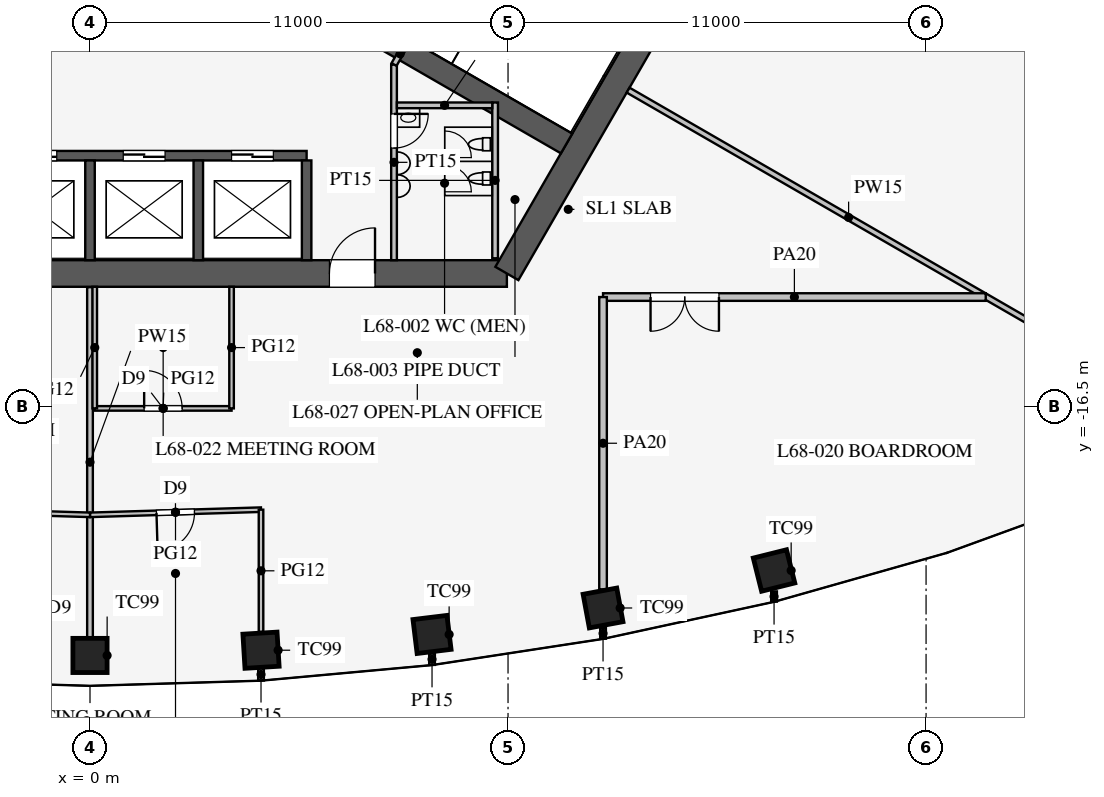
"""IFC4 building model, lengths in metres.
Left out: names, types, materials, properties, quantities, classifications, styles, units other than length and angle.
Written with IfcOpenShell. Run it as: python <this file> out.ifc"""

import sys

from ifc_helpers import new_model, si_unit, direction, frame, frame_2d, origin, origin_2d, place, context, subcontext, project, spatial, rectangle, extrude, element, fill, save


model = new_model("IFC4")
c1 = context("Model", 3, precision=1e-05, world=origin(), true_north=direction((0.0, 1.0)))
c2 = subcontext(c1, "Body", "Model", "MODEL_VIEW")
j1 = project(units=[si_unit("LENGTHUNIT", "METRE"), si_unit("PLANEANGLEUNIT", "RADIAN")], contexts=[c1])
p1 = place(None, origin())
s1 = spatial("IfcSite", under=j1, at=p1, CompositionType="ELEMENT")
p2 = place(p1, origin())
s2 = spatial("IfcBuilding", under=s1, at=p2, CompositionType="ELEMENT")
p3 = place(p2, frame((0.0, 0.0, 297.3)))
s3 = spatial("IfcBuildingStorey", under=s2, at=p3, CompositionType="ELEMENT", Elevation=297.3)
for number, where, z_axis, x_axis in (
    (1, (0.0, -23.052, 0.0), (0.0, 0.0, 1.0), (1.0, 0.0, 0.0)),
    (2, (4.5, -22.914, 0.0), (0.0, 0.0, 1.0), (0.998, 0.061, 0.0)),
    (3, (9.0, -22.499, 0.0), (0.0, 0.0, 1.0), (0.993, 0.121, 0.0)),
    (4, (13.5, -21.803, 0.0), (0.0, 0.0, 1.0), (0.983, 0.182, 0.0)),
    (5, (18.0, -20.816, 0.0), (0.0, 0.0, 1.0), (0.97, 0.242, 0.0)),
):
    element("IfcColumn", number, at=place(p3, frame(where, z_axis=z_axis, x_axis=x_axis)), inside=s3, PredefinedType="COLUMN", context=c2, shape_type="SweptSolid", body=[
        extrude(rectangle(XDim=0.9, YDim=0.9, at=origin_2d()), origin(), (0.0, 0.0, 1.0), 4.2),
    ])
p4 = place(p3, frame((-10.97, -13.0, 0.0), z_axis=(0.0, 0.0, 1.0), x_axis=(1.0, 0.0, 0.0)))
e6 = element("IfcWall", 6, at=p4, inside=s3, PredefinedType="SHEAR", context=c2, shape_type="SweptSolid", body=[
    extrude(rectangle(XDim=21.939, YDim=0.7, at=frame_2d((10.97, 0.0))), origin(), (0.0, 0.0, 1.0), 4.2),
])
p5 = place(p4, frame((17.27, 0.0, 0.0)))
e7 = element("IfcOpeningElement", 7, at=p5, cuts=e6, PredefinedType="OPENING", context=c2, shape_type="SweptSolid", body=[
    extrude(rectangle(XDim=1.2, YDim=2.1, at=frame_2d((0.6, 1.05))), frame((0.0, 0.36, 0.0), z_axis=(0.0, -1.0, 0.0), x_axis=(1.0, 0.0, 0.0)), (0.0, 0.0, 1.0), 0.72),
])
p6 = place(p4, frame((3.47, 0.0, 0.0)))
e8 = element("IfcOpeningElement", 8, at=p6, cuts=e6, PredefinedType="OPENING", context=c2, shape_type="SweptSolid", body=[
    extrude(rectangle(XDim=1.2, YDim=2.1, at=frame_2d((0.6, 1.05))), frame((0.0, 0.36, 0.0), z_axis=(0.0, -1.0, 0.0), x_axis=(1.0, 0.0, 0.0)), (0.0, 0.0, 1.0), 0.72),
])
p7 = place(p3, frame((10.97, -13.0, 0.0), z_axis=(0.0, 0.0, 1.0), x_axis=(0.499995765644, 0.866027848477, 0.0)))
e9 = element("IfcWall", 9, at=p7, inside=s3, PredefinedType="SHEAR", context=c2, shape_type="SweptSolid", body=[
    extrude(rectangle(XDim=11.547, YDim=0.7, at=frame_2d((5.773, 0.0))), origin(), (0.0, 0.0, 1.0), 4.2),
])
p8 = place(p3, frame((-5.7, -9.9, 0.0), z_axis=(0.0, 0.0, 1.0), x_axis=(1.0, 0.0, 0.0)))
e10 = element("IfcWall", 10, at=p8, inside=s3, PredefinedType="SHEAR", context=c2, shape_type="SweptSolid", body=[
    extrude(rectangle(XDim=11.4, YDim=0.25, at=frame_2d((5.7, 0.0))), origin(), (0.0, 0.0, 1.0), 4.2),
])
p9 = place(p8, frame((0.875, 0.0, 0.0)))
e11 = element("IfcOpeningElement", 11, at=p9, cuts=e10, PredefinedType="OPENING", context=c2, shape_type="SweptSolid", body=[
    extrude(rectangle(XDim=1.1, YDim=2.2, at=frame_2d((0.55, 1.1))), frame((0.0, 0.135, 0.0), z_axis=(0.0, -1.0, 0.0), x_axis=(1.0, 0.0, 0.0)), (0.0, 0.0, 1.0), 0.27),
])
p10 = place(p8, frame((3.725, 0.0, 0.0)))
e12 = element("IfcOpeningElement", 12, at=p10, cuts=e10, PredefinedType="OPENING", context=c2, shape_type="SweptSolid", body=[
    extrude(rectangle(XDim=1.1, YDim=2.2, at=frame_2d((0.55, 1.1))), frame((0.0, 0.135, 0.0), z_axis=(0.0, -1.0, 0.0), x_axis=(1.0, 0.0, 0.0)), (0.0, 0.0, 1.0), 0.27),
])
p11 = place(p8, frame((6.575, 0.0, 0.0)))
e13 = element("IfcOpeningElement", 13, at=p11, cuts=e10, PredefinedType="OPENING", context=c2, shape_type="SweptSolid", body=[
    extrude(rectangle(XDim=1.1, YDim=2.2, at=frame_2d((0.55, 1.1))), frame((0.0, 0.135, 0.0), z_axis=(0.0, -1.0, 0.0), x_axis=(1.0, 0.0, 0.0)), (0.0, 0.0, 1.0), 0.27),
])
p12 = place(p8, frame((9.425, 0.0, 0.0)))
e14 = element("IfcOpeningElement", 14, at=p12, cuts=e10, PredefinedType="OPENING", context=c2, shape_type="SweptSolid", body=[
    extrude(rectangle(XDim=1.1, YDim=2.2, at=frame_2d((0.55, 1.1))), frame((0.0, 0.135, 0.0), z_axis=(0.0, -1.0, 0.0), x_axis=(1.0, 0.0, 0.0)), (0.0, 0.0, 1.0), 0.27),
])
for number, where, z_axis, x_axis in (
    (15, (0.0, -10.025, 0.0), (0.0, 0.0, 1.0), (0.0, -1.0, 0.0)),
    (16, (2.85, -10.025, 0.0), (0.0, 0.0, 1.0), (0.0, -1.0, 0.0)),
    (17, (5.7, -10.025, 0.0), (0.0, 0.0, 1.0), (0.0, -1.0, 0.0)),
):
    element("IfcWall", number, at=place(p3, frame(where, z_axis=z_axis, x_axis=x_axis)), inside=s3, PredefinedType="SHEAR", context=c2, shape_type="SweptSolid", body=[
        extrude(rectangle(XDim=2.625, YDim=0.25, at=frame_2d((1.312, 0.0))), origin(), (0.0, 0.0, 1.0), 4.2),
    ])
p13 = place(p3, frame((4.638, -5.016, 0.0), z_axis=(0.0, 0.0, 1.0), x_axis=(0.866021621257, -0.500006551472, 0.0)))
e18 = element("IfcWall", 18, at=p13, inside=s3, PredefinedType="SHEAR", context=c2, shape_type="SweptSolid", body=[
    extrude(rectangle(XDim=9.125, YDim=0.6, at=frame_2d((4.562, 0.0))), origin(), (0.0, 0.0, 1.0), 4.2),
])
p14 = place(p3, frame((8.0, -7.5, 0.0), z_axis=(0.0, 0.0, 1.0), x_axis=(0.0, -1.0, 0.0)))
e19 = element("IfcWall", 19, at=p14, inside=s3, PredefinedType="PARTITIONING", context=c2, shape_type="SweptSolid", body=[
    extrude(rectangle(XDim=5.15, YDim=0.15, at=frame_2d((2.575, 0.0))), origin(), (0.0, 0.0, 1.0), 4.0),
])
p15 = place(p14, frame((1.3, 0.0, 0.0)))
e20 = element("IfcOpeningElement", 20, at=p15, cuts=e19, PredefinedType="OPENING", context=c2, shape_type="SweptSolid", body=[
    extrude(rectangle(XDim=0.9, YDim=2.1, at=frame_2d((0.45, 1.05))), frame((0.0, 0.085, 0.0), z_axis=(0.0, -1.0, 0.0), x_axis=(1.0, 0.0, 0.0)), (0.0, 0.0, 1.0), 0.17),
])
p16 = place(p3, frame((8.0, -7.5, 0.0), z_axis=(0.0, 0.0, 1.0), x_axis=(0.499842556608, 0.866116284689, 0.0)))
e21 = element("IfcWall", 21, at=p16, inside=s3, PredefinedType="PARTITIONING", context=c2, shape_type="SweptSolid", body=[
    extrude(rectangle(XDim=0.645, YDim=0.15, at=frame_2d((0.323, 0.0))), origin(), (0.0, 0.0, 1.0), 4.0),
])
p17 = place(p3, frame((10.66, -8.5, 0.0), z_axis=(0.0, 0.0, 1.0), x_axis=(0.0, -1.0, 0.0)))
e22 = element("IfcWall", 22, at=p17, inside=s3, PredefinedType="PARTITIONING", context=c2, shape_type="SweptSolid", body=[
    extrude(rectangle(XDim=4.1, YDim=0.15, at=frame_2d((2.05, 0.0))), origin(), (0.0, 0.0, 1.0), 4.0),
])
p18 = place(p3, frame((8.075, -8.575, 0.0), z_axis=(0.0, 0.0, 1.0), x_axis=(1.0, 0.0, 0.0)))
e23 = element("IfcWall", 23, at=p18, inside=s3, PredefinedType="PARTITIONING", context=c2, shape_type="SweptSolid", body=[
    extrude(rectangle(XDim=2.51, YDim=0.15, at=frame_2d((1.255, 0.0))), origin(), (0.0, 0.0, 1.0), 4.0),
])
p19 = place(p3, frame((14.159, -8.175, 0.0), z_axis=(0.0, 0.0, 1.0), x_axis=(0.866026905467, -0.499997399001, 0.0)))
e24 = element("IfcWall", 24, at=p19, inside=s3, PredefinedType="PARTITIONING", context=c2, shape_type="SweptSolid", body=[
    extrude(rectangle(XDim=13.4, YDim=0.15, at=frame_2d((6.7, 0.0))), origin(), (0.0, 0.0, 1.0), 2.5),
])
p20 = place(p3, frame((13.5, -13.62, 0.0), z_axis=(0.0, 0.0, 1.0), x_axis=(1.0, 0.0, 0.0)))
e25 = element("IfcWall", 25, at=p20, inside=s3, PredefinedType="PARTITIONING", context=c2, shape_type="SweptSolid", body=[
    extrude(rectangle(XDim=10.07, YDim=0.2, at=frame_2d((5.035, 0.0))), origin(), (0.0, 0.0, 1.0), 2.9),
])
p21 = place(p20, frame((1.25, 0.0, 0.15)))
e26 = element("IfcOpeningElement", 26, at=p21, cuts=e25, PredefinedType="OPENING", context=c2, shape_type="SweptSolid", body=[
    extrude(rectangle(XDim=1.8, YDim=2.1, at=frame_2d((0.9, 1.05))), frame((0.0, 0.11, 0.0), z_axis=(0.0, -1.0, 0.0), x_axis=(1.0, 0.0, 0.0)), (0.0, 0.0, 1.0), 0.22),
])
p22 = place(p3, frame((0.0, -13.36, 0.0), z_axis=(0.0, 0.0, 1.0), x_axis=(0.0, -1.0, 0.0)))
e27 = element("IfcWall", 27, at=p22, inside=s3, PredefinedType="PARTITIONING", context=c2, shape_type="SweptSolid", body=[
    extrude(rectangle(XDim=9.211, YDim=0.15, at=frame_2d((4.606, 0.0))), origin(), (0.0, 0.0, 1.0), 3.3),
])
p23 = place(p3, frame((0.125, -16.55, 0.0), z_axis=(0.0, 0.0, 1.0), x_axis=(1.0, 0.0, 0.0)))
e28 = element("IfcWall", 28, at=p23, inside=s3, PredefinedType="PARTITIONING", context=c2, shape_type="SweptSolid", body=[
    extrude(rectangle(XDim=3.6, YDim=0.12, at=frame_2d((1.8, 0.0))), origin(), (0.0, 0.0, 1.0), 2.9),
])
p24 = place(p23, frame((1.3, 0.0, 0.15)))
e29 = element("IfcOpeningElement", 29, at=p24, cuts=e28, PredefinedType="OPENING", context=c2, shape_type="SweptSolid", body=[
    extrude(rectangle(XDim=1.0, YDim=2.1, at=frame_2d((0.5, 1.05))), frame((0.0, 0.07, 0.0), z_axis=(0.0, -1.0, 0.0), x_axis=(1.0, 0.0, 0.0)), (0.0, 0.0, 1.0), 0.14),
])
for number, where, z_axis, x_axis in (
    (30, (0.125, -13.35, 0.0), (0.0, 0.0, 1.0), (0.0, -1.0, 0.0)),
    (31, (3.725, -13.35, 0.0), (0.0, 0.0, 1.0), (0.0, -1.0, 0.0)),
):
    element("IfcWall", number, at=place(p3, frame(where, z_axis=z_axis, x_axis=x_axis)), inside=s3, PredefinedType="PARTITIONING", context=c2, shape_type="SweptSolid", body=[
        extrude(rectangle(XDim=3.2, YDim=0.12, at=frame_2d((1.6, 0.0))), origin(), (0.0, 0.0, 1.0), 2.9),
    ])
p25 = place(p3, frame((13.5, -22.331, 0.0), z_axis=(0.0, 0.0, 1.0), x_axis=(0.0, -1.0, 0.0)))
e32 = element("IfcWall", 32, at=p25, inside=s3, PredefinedType="PARTITIONING", context=c2, shape_type="SweptSolid", body=[
    extrude(rectangle(XDim=0.28, YDim=0.15, at=frame_2d((0.14, 0.0))), origin(), (0.0, 0.0, 1.0), 2.9),
])
p26 = place(p3, frame((18.0, -21.366, 0.0), z_axis=(0.0, 0.0, 1.0), x_axis=(0.0, -1.0, 0.0)))
e33 = element("IfcWall", 33, at=p26, inside=s3, PredefinedType="PARTITIONING", context=c2, shape_type="SweptSolid", body=[
    extrude(rectangle(XDim=0.27, YDim=0.15, at=frame_2d((0.135, 0.0))), origin(), (0.0, 0.0, 1.0), 2.9),
])
p27 = place(p3, frame((4.5, -23.394, 0.0), z_axis=(0.0, 0.0, 1.0), x_axis=(0.0, -1.0, 0.0)))
e34 = element("IfcWall", 34, at=p27, inside=s3, PredefinedType="PARTITIONING", context=c2, shape_type="SweptSolid", body=[
    extrude(rectangle(XDim=0.316, YDim=0.15, at=frame_2d((0.158, 0.0))), origin(), (0.0, 0.0, 1.0), 2.9),
])
p28 = place(p3, frame((9.0, -23.004, 0.0), z_axis=(0.0, 0.0, 1.0), x_axis=(0.0, -1.0, 0.0)))
e35 = element("IfcWall", 35, at=p28, inside=s3, PredefinedType="PARTITIONING", context=c2, shape_type="SweptSolid", body=[
    extrude(rectangle(XDim=0.296, YDim=0.15, at=frame_2d((0.148, 0.0))), origin(), (0.0, 0.0, 1.0), 2.9),
])
p29 = place(p3, frame((0.0, -19.352, 0.0), z_axis=(0.0, 0.0, 1.0), x_axis=(0.999542074227, 0.030259574513, 0.0)))
e36 = element("IfcWall", 36, at=p29, inside=s3, PredefinedType="PARTITIONING", context=c2, shape_type="SweptSolid", body=[
    extrude(rectangle(XDim=4.502, YDim=0.12, at=frame_2d((2.251, 0.0))), origin(), (0.0, 0.0, 1.0), 2.9),
])
p30 = place(p29, frame((1.75, 0.0, 0.15)))
e37 = element("IfcOpeningElement", 37, at=p30, cuts=e36, PredefinedType="OPENING", context=c2, shape_type="SweptSolid", body=[
    extrude(rectangle(XDim=1.0, YDim=2.1, at=frame_2d((0.5, 1.05))), frame((0.0, 0.07, 0.0), z_axis=(0.0, -1.0, 0.0), x_axis=(1.0, 0.0, 0.0)), (0.0, 0.0, 1.0), 0.14),
])
p31 = place(p3, frame((-4.5, -19.215, 0.0), z_axis=(0.0, 0.0, 1.0), x_axis=(0.999542074227, -0.030259574513, 0.0)))
e38 = element("IfcWall", 38, at=p31, inside=s3, PredefinedType="PARTITIONING", context=c2, shape_type="SweptSolid", body=[
    extrude(rectangle(XDim=4.502, YDim=0.12, at=frame_2d((2.251, 0.0))), origin(), (0.0, 0.0, 1.0), 2.9),
])
p32 = place(p31, frame((1.75, 0.0, 0.15)))
e39 = element("IfcOpeningElement", 39, at=p32, cuts=e38, PredefinedType="OPENING", context=c2, shape_type="SweptSolid", body=[
    extrude(rectangle(XDim=1.0, YDim=2.1, at=frame_2d((0.5, 1.05))), frame((0.0, 0.07, 0.0), z_axis=(0.0, -1.0, 0.0), x_axis=(1.0, 0.0, 0.0)), (0.0, 0.0, 1.0), 0.14),
])
p33 = place(p3, frame((13.5, -13.62, 0.0), z_axis=(0.0, 0.0, 1.0), x_axis=(0.0, -1.0, 0.0)))
e40 = element("IfcWall", 40, at=p33, inside=s3, PredefinedType="PARTITIONING", context=c2, shape_type="SweptSolid", body=[
    extrude(rectangle(XDim=7.695, YDim=0.2, at=frame_2d((3.847, 0.0))), origin(), (0.0, 0.0, 1.0), 2.9),
])
p34 = place(p3, frame((4.5, -19.215, 0.0), z_axis=(0.0, 0.0, 1.0), x_axis=(0.0, -1.0, 0.0)))
e41 = element("IfcWall", 41, at=p34, inside=s3, PredefinedType="PARTITIONING", context=c2, shape_type="SweptSolid", body=[
    extrude(rectangle(XDim=3.218, YDim=0.12, at=frame_2d((1.609, 0.0))), origin(), (0.0, 0.0, 1.0), 2.9),
])
p35 = place(p15, origin())
e42 = element("IfcDoor", 42, at=p35, inside=s3, OperationType="SINGLE_SWING_LEFT", PredefinedType="DOOR", context=c2, shape_type="SweptSolid", body=[
    extrude(rectangle(XDim=0.9, YDim=2.1, at=frame_2d((0.45, 1.05))), frame((0.0, 0.025, 0.0), z_axis=(0.0, -1.0, 0.0), x_axis=(1.0, 0.0, 0.0)), (0.0, 0.0, 1.0), 0.05),
])
fill(e20, e42)
p36 = place(p5, origin())
e43 = element("IfcDoor", 43, at=p36, inside=s3, OperationType="SINGLE_SWING_RIGHT", PredefinedType="DOOR", context=c2, shape_type="SweptSolid", body=[
    extrude(rectangle(XDim=1.2, YDim=2.1, at=frame_2d((0.6, 1.05))), frame((0.0, 0.025, 0.0), z_axis=(0.0, -1.0, 0.0), x_axis=(1.0, 0.0, 0.0)), (0.0, 0.0, 1.0), 0.05),
])
fill(e7, e43)
p37 = place(p21, frame((1.8, 0.0, 0.0), z_axis=(0.0, 0.0, 1.0), x_axis=(-1.0, 0.0, 0.0)))
e44 = element("IfcDoor", 44, at=p37, inside=s3, OperationType="DOUBLE_DOOR_SINGLE_SWING", PredefinedType="DOOR", context=c2, shape_type="SweptSolid", body=[
    extrude(rectangle(XDim=1.8, YDim=2.1, at=frame_2d((0.9, 1.05))), frame((0.0, 0.025, 0.0), z_axis=(0.0, -1.0, 0.0), x_axis=(1.0, 0.0, 0.0)), (0.0, 0.0, 1.0), 0.05),
])
fill(e26, e44)
p38 = place(p24, origin())
e45 = element("IfcDoor", 45, at=p38, inside=s3, OperationType="SINGLE_SWING_LEFT", PredefinedType="DOOR", context=c2, shape_type="SweptSolid", body=[
    extrude(rectangle(XDim=1.0, YDim=2.1, at=frame_2d((0.5, 1.05))), frame((0.0, 0.025, 0.0), z_axis=(0.0, -1.0, 0.0), x_axis=(1.0, 0.0, 0.0)), (0.0, 0.0, 1.0), 0.05),
])
fill(e29, e45)
p39 = place(p30, frame((1.0, 0.0, 0.0), z_axis=(0.0, 0.0, 1.0), x_axis=(-1.0, 0.0, 0.0)))
e46 = element("IfcDoor", 46, at=p39, inside=s3, OperationType="SINGLE_SWING_RIGHT", PredefinedType="DOOR", context=c2, shape_type="SweptSolid", body=[
    extrude(rectangle(XDim=1.0, YDim=2.1, at=frame_2d((0.5, 1.05))), frame((0.0, 0.025, 0.0), z_axis=(0.0, -1.0, 0.0), x_axis=(1.0, 0.0, 0.0)), (0.0, 0.0, 1.0), 0.05),
])
fill(e37, e46)
p40 = place(p10, origin())
e47 = element("IfcDoor", 47, at=p40, inside=s3, OperationType="DOUBLE_DOOR_SLIDING", PredefinedType="DOOR", context=c2, shape_type="SweptSolid", body=[
    extrude(rectangle(XDim=1.1, YDim=2.2, at=frame_2d((0.55, 1.1))), frame((0.0, 0.025, 0.0), z_axis=(0.0, -1.0, 0.0), x_axis=(1.0, 0.0, 0.0)), (0.0, 0.0, 1.0), 0.05),
])
fill(e12, e47)
p41 = place(p11, origin())
e48 = element("IfcDoor", 48, at=p41, inside=s3, OperationType="DOUBLE_DOOR_SLIDING", PredefinedType="DOOR", context=c2, shape_type="SweptSolid", body=[
    extrude(rectangle(XDim=1.1, YDim=2.2, at=frame_2d((0.55, 1.1))), frame((0.0, 0.025, 0.0), z_axis=(0.0, -1.0, 0.0), x_axis=(1.0, 0.0, 0.0)), (0.0, 0.0, 1.0), 0.05),
])
fill(e13, e48)
p42 = place(p12, origin())
e49 = element("IfcDoor", 49, at=p42, inside=s3, OperationType="DOUBLE_DOOR_SLIDING", PredefinedType="DOOR", context=c2, shape_type="SweptSolid", body=[
    extrude(rectangle(XDim=1.1, YDim=2.2, at=frame_2d((0.55, 1.1))), frame((0.0, 0.025, 0.0), z_axis=(0.0, -1.0, 0.0), x_axis=(1.0, 0.0, 0.0)), (0.0, 0.0, 1.0), 0.05),
])
fill(e14, e49)
save(model, sys.argv[1])
